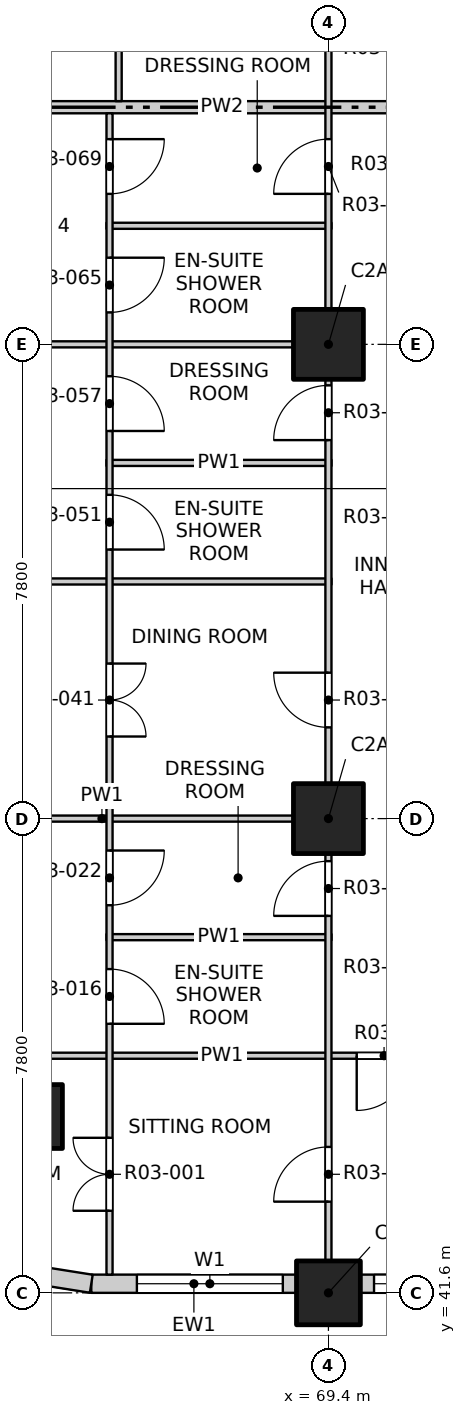
"""IFC4 building model, lengths in metres.
Left out: names, types, materials, properties, quantities, classifications, styles, units other than length and angle.
Written with IfcOpenShell. Run it as: python <this file> out.ifc"""

import sys

from ifc_helpers import new_model, si_unit, direction, frame, frame_2d, origin, origin_2d, place, context, subcontext, project, spatial, rectangle, extrude, element, fill, save


model = new_model("IFC4")
c1 = context("Model", 3, precision=1e-05, world=origin(), true_north=direction((0.0, 1.0)))
c2 = subcontext(c1, "Body", "Model", "MODEL_VIEW")
j1 = project(units=[si_unit("LENGTHUNIT", "METRE"), si_unit("PLANEANGLEUNIT", "RADIAN")], contexts=[c1])
p1 = place(None, origin())
s1 = spatial("IfcSite", under=j1, at=p1, CompositionType="ELEMENT")
p2 = place(p1, origin())
s2 = spatial("IfcBuilding", under=s1, at=p2, CompositionType="ELEMENT")
p3 = place(p2, frame((0.0, 0.0, 39.9)))
s3 = spatial("IfcBuildingStorey", under=s2, at=p3, CompositionType="ELEMENT", Elevation=39.9)
for number, where, z_axis, x_axis in (
    (1, (64.5, 44.5, -0.25), (0.0, 0.0, 1.0), (1.0, 0.0, 0.0)),
    (2, (69.4, 41.6, -0.25), (0.0, 0.0, 1.0), (1.0, 0.0, 0.0)),
):
    element("IfcColumn", number, at=place(p3, frame(where, z_axis=z_axis, x_axis=x_axis)), inside=s3, PredefinedType="COLUMN", context=c2, shape_type="SweptSolid", body=[
        extrude(rectangle(XDim=1.05, YDim=1.05, at=origin_2d()), origin(), (0.0, 0.0, 1.0), 3.4),
    ])
for number, where, z_axis, x_axis in (
    (3, (69.4, 49.4, -0.25), (0.0, 0.0, 1.0), (1.0, 0.0, 0.0)),
    (4, (69.4, 57.2, -0.25), (0.0, 0.0, 1.0), (1.0, 0.0, 0.0)),
):
    element("IfcColumn", number, at=place(p3, frame(where, z_axis=z_axis, x_axis=x_axis)), inside=s3, PredefinedType="COLUMN", context=c2, shape_type="SweptSolid", body=[
        extrude(rectangle(XDim=1.15, YDim=1.15, at=origin_2d()), origin(), (0.0, 0.0, 1.0), 3.4),
    ])
p4 = place(p3, frame((65.5, 41.75, 0.0), z_axis=(0.0, 0.0, 1.0), x_axis=(1.0, 0.0, 0.0)))
e5 = element("IfcWall", 5, at=p4, inside=s3, PredefinedType="SOLIDWALL", context=c2, shape_type="SweptSolid", body=[
    extrude(rectangle(XDim=3.375, YDim=0.3, at=frame_2d((1.688, 0.0))), origin(), (0.0, 0.0, 1.0), 2.7),
])
p5 = place(p4, frame((0.75, 0.0, 0.9)))
e6 = element("IfcOpeningElement", 6, at=p5, cuts=e5, PredefinedType="OPENING", context=c2, shape_type="SweptSolid", body=[
    extrude(rectangle(XDim=2.4, YDim=1.8, at=frame_2d((1.2, 0.9))), frame((0.0, 0.16, 0.0), z_axis=(0.0, -1.0, 0.0), x_axis=(1.0, 0.0, 0.0)), (0.0, 0.0, 1.0), 0.32),
])
p6 = place(p3, frame((69.925, 41.75, 0.0), z_axis=(0.0, 0.0, 1.0), x_axis=(1.0, 0.0, 0.0)))
e7 = element("IfcWall", 7, at=p6, inside=s3, PredefinedType="SOLIDWALL", context=c2, shape_type="SweptSolid", body=[
    extrude(rectangle(XDim=6.75, YDim=0.3, at=frame_2d((3.375, 0.0))), origin(), (0.0, 0.0, 1.0), 2.7),
])
p7 = place(p6, frame((0.225, 0.0, 0.9)))
e8 = element("IfcOpeningElement", 8, at=p7, cuts=e7, PredefinedType="OPENING", context=c2, shape_type="SweptSolid", body=[
    extrude(rectangle(XDim=2.4, YDim=1.8, at=frame_2d((1.2, 0.9))), frame((0.0, 0.16, 0.0), z_axis=(0.0, -1.0, 0.0), x_axis=(1.0, 0.0, 0.0)), (0.0, 0.0, 1.0), 0.32),
])
p8 = place(p6, frame((4.125, 0.0, 0.9)))
e9 = element("IfcOpeningElement", 9, at=p8, cuts=e7, PredefinedType="OPENING", context=c2, shape_type="SweptSolid", body=[
    extrude(rectangle(XDim=2.4, YDim=1.8, at=frame_2d((1.2, 0.9))), frame((0.0, 0.16, 0.0), z_axis=(0.0, -1.0, 0.0), x_axis=(1.0, 0.0, 0.0)), (0.0, 0.0, 1.0), 0.32),
])
p9 = place(p3, frame((64.341, 41.934, 0.0), z_axis=(0.0, 0.0, 1.0), x_axis=(0.987678452879, -0.156496880861, 0.0)))
e10 = element("IfcWall", 10, at=p9, inside=s3, PredefinedType="SOLIDWALL", context=c2, shape_type="SweptSolid", body=[
    extrude(rectangle(XDim=1.173, YDim=0.3, at=frame_2d((0.586, 0.0))), origin(), (0.0, 0.0, 1.0), 2.7),
])
p10 = place(p3, frame((61.9, 45.5, 0.0), z_axis=(0.0, 0.0, 1.0), x_axis=(1.0, 0.0, 0.0)))
e11 = element("IfcWall", 11, at=p10, inside=s3, PredefinedType="PARTITIONING", context=c2, shape_type="SweptSolid", body=[
    extrude(rectangle(XDim=11.5, YDim=0.1, at=frame_2d((5.75, 0.0))), origin(), (0.0, 0.0, 1.0), 3.15),
])
p11 = place(p10, frame((7.965, 0.0, 0.0)))
e12 = element("IfcOpeningElement", 12, at=p11, cuts=e11, PredefinedType="OPENING", context=c2, shape_type="SweptSolid", body=[
    extrude(rectangle(XDim=0.9, YDim=2.1, at=frame_2d((0.45, 1.05))), frame((0.0, 0.06, 0.0), z_axis=(0.0, -1.0, 0.0), x_axis=(1.0, 0.0, 0.0)), (0.0, 0.0, 1.0), 0.12),
])
p12 = place(p3, frame((65.75, 47.45, 0.0), z_axis=(0.0, 0.0, 1.0), x_axis=(1.0, 0.0, 0.0)))
e13 = element("IfcWall", 13, at=p12, inside=s3, PredefinedType="PARTITIONING", context=c2, shape_type="SweptSolid", body=[
    extrude(rectangle(XDim=3.7, YDim=0.1, at=frame_2d((1.85, 0.0))), origin(), (0.0, 0.0, 1.0), 3.15),
])
for number, where, z_axis, x_axis in (
    (14, (61.9, 49.4, 0.0), (0.0, 0.0, 1.0), (1.0, 0.0, 0.0)),
    (15, (61.9, 53.3, 0.0), (0.0, 0.0, 1.0), (1.0, 0.0, 0.0)),
):
    element("IfcWall", number, at=place(p3, frame(where, z_axis=z_axis, x_axis=x_axis)), inside=s3, PredefinedType="PARTITIONING", context=c2, shape_type="SweptSolid", body=[
        extrude(rectangle(XDim=7.55, YDim=0.1, at=frame_2d((3.775, 0.0))), origin(), (0.0, 0.0, 1.0), 3.15),
    ])
p13 = place(p3, frame((65.75, 55.25, 0.0), z_axis=(0.0, 0.0, 1.0), x_axis=(1.0, 0.0, 0.0)))
e16 = element("IfcWall", 16, at=p13, inside=s3, PredefinedType="PARTITIONING", context=c2, shape_type="SweptSolid", body=[
    extrude(rectangle(XDim=3.7, YDim=0.1, at=frame_2d((1.85, 0.0))), origin(), (0.0, 0.0, 1.0), 3.15),
])
p14 = place(p3, frame((61.9, 57.2, 0.0), z_axis=(0.0, 0.0, 1.0), x_axis=(1.0, 0.0, 0.0)))
e17 = element("IfcWall", 17, at=p14, inside=s3, PredefinedType="PARTITIONING", context=c2, shape_type="SweptSolid", body=[
    extrude(rectangle(XDim=7.55, YDim=0.1, at=frame_2d((3.775, 0.0))), origin(), (0.0, 0.0, 1.0), 2.55),
])
p15 = place(p3, frame((65.75, 59.15, 0.0), z_axis=(0.0, 0.0, 1.0), x_axis=(1.0, 0.0, 0.0)))
e18 = element("IfcWall", 18, at=p15, inside=s3, PredefinedType="PARTITIONING", context=c2, shape_type="SweptSolid", body=[
    extrude(rectangle(XDim=3.7, YDim=0.1, at=frame_2d((1.85, 0.0))), origin(), (0.0, 0.0, 1.0), 3.15),
])
p16 = place(p3, frame((61.9, 61.1, 0.0), z_axis=(0.0, 0.0, 1.0), x_axis=(1.0, 0.0, 0.0)))
e19 = element("IfcWall", 19, at=p16, inside=s3, PredefinedType="PARTITIONING", context=c2, shape_type="SweptSolid", body=[
    extrude(rectangle(XDim=11.5, YDim=0.2, at=frame_2d((5.75, 0.0))), origin(), (0.0, 0.0, 1.0), 3.15),
])
p17 = place(p3, frame((65.8, 41.9, 0.0), z_axis=(0.0, 0.0, 1.0), x_axis=(0.0, 1.0, 0.0)))
e20 = element("IfcWall", 20, at=p17, inside=s3, PredefinedType="PARTITIONING", context=c2, shape_type="SweptSolid", body=[
    extrude(rectangle(XDim=19.1, YDim=0.1, at=frame_2d((9.55, 0.0))), origin(), (0.0, 0.0, 1.0), 3.15),
])
p18 = place(p17, frame((1.05, 0.0, 0.0)))
e21 = element("IfcOpeningElement", 21, at=p18, cuts=e20, PredefinedType="OPENING", context=c2, shape_type="SweptSolid", body=[
    extrude(rectangle(XDim=1.2, YDim=2.1, at=frame_2d((0.6, 1.05))), frame((0.0, 0.06, 0.0), z_axis=(0.0, -1.0, 0.0), x_axis=(1.0, 0.0, 0.0)), (0.0, 0.0, 1.0), 0.12),
])
p19 = place(p17, frame((4.125, 0.0, 0.0)))
e22 = element("IfcOpeningElement", 22, at=p19, cuts=e20, PredefinedType="OPENING", context=c2, shape_type="SweptSolid", body=[
    extrude(rectangle(XDim=0.9, YDim=2.1, at=frame_2d((0.45, 1.05))), frame((0.0, 0.06, 0.0), z_axis=(0.0, -1.0, 0.0), x_axis=(1.0, 0.0, 0.0)), (0.0, 0.0, 1.0), 0.12),
])
p20 = place(p17, frame((6.075, 0.0, 0.0)))
e23 = element("IfcOpeningElement", 23, at=p20, cuts=e20, PredefinedType="OPENING", context=c2, shape_type="SweptSolid", body=[
    extrude(rectangle(XDim=0.9, YDim=2.1, at=frame_2d((0.45, 1.05))), frame((0.0, 0.06, 0.0), z_axis=(0.0, -1.0, 0.0), x_axis=(1.0, 0.0, 0.0)), (0.0, 0.0, 1.0), 0.12),
])
p21 = place(p17, frame((8.85, 0.0, 0.0)))
e24 = element("IfcOpeningElement", 24, at=p21, cuts=e20, PredefinedType="OPENING", context=c2, shape_type="SweptSolid", body=[
    extrude(rectangle(XDim=1.2, YDim=2.1, at=frame_2d((0.6, 1.05))), frame((0.0, 0.06, 0.0), z_axis=(0.0, -1.0, 0.0), x_axis=(1.0, 0.0, 0.0)), (0.0, 0.0, 1.0), 0.12),
])
p22 = place(p17, frame((11.925, 0.0, 0.0)))
e25 = element("IfcOpeningElement", 25, at=p22, cuts=e20, PredefinedType="OPENING", context=c2, shape_type="SweptSolid", body=[
    extrude(rectangle(XDim=0.9, YDim=2.1, at=frame_2d((0.45, 1.05))), frame((0.0, 0.06, 0.0), z_axis=(0.0, -1.0, 0.0), x_axis=(1.0, 0.0, 0.0)), (0.0, 0.0, 1.0), 0.12),
])
p23 = place(p17, frame((13.875, 0.0, 0.0)))
e26 = element("IfcOpeningElement", 26, at=p23, cuts=e20, PredefinedType="OPENING", context=c2, shape_type="SweptSolid", body=[
    extrude(rectangle(XDim=0.9, YDim=2.1, at=frame_2d((0.45, 1.05))), frame((0.0, 0.06, 0.0), z_axis=(0.0, -1.0, 0.0), x_axis=(1.0, 0.0, 0.0)), (0.0, 0.0, 1.0), 0.12),
])
p24 = place(p17, frame((15.825, 0.0, 0.0)))
e27 = element("IfcOpeningElement", 27, at=p24, cuts=e20, PredefinedType="OPENING", context=c2, shape_type="SweptSolid", body=[
    extrude(rectangle(XDim=0.9, YDim=2.1, at=frame_2d((0.45, 1.05))), frame((0.0, 0.06, 0.0), z_axis=(0.0, -1.0, 0.0), x_axis=(1.0, 0.0, 0.0)), (0.0, 0.0, 1.0), 0.12),
])
p25 = place(p17, frame((17.775, 0.0, 0.0)))
e28 = element("IfcOpeningElement", 28, at=p25, cuts=e20, PredefinedType="OPENING", context=c2, shape_type="SweptSolid", body=[
    extrude(rectangle(XDim=0.9, YDim=2.1, at=frame_2d((0.45, 1.05))), frame((0.0, 0.06, 0.0), z_axis=(0.0, -1.0, 0.0), x_axis=(1.0, 0.0, 0.0)), (0.0, 0.0, 1.0), 0.12),
])
p26 = place(p3, frame((65.95, 61.2, 0.0), z_axis=(0.0, 0.0, 1.0), x_axis=(0.0, 1.0, 0.0)))
e29 = element("IfcWall", 29, at=p26, inside=s3, PredefinedType="PARTITIONING", context=c2, shape_type="SweptSolid", body=[
    extrude(rectangle(XDim=7.6, YDim=0.1, at=frame_2d((3.8, 0.0))), origin(), (0.0, 0.0, 1.0), 3.15),
])
p27 = place(p26, frame((1.25, 0.0, 0.0)))
e30 = element("IfcOpeningElement", 30, at=p27, cuts=e29, PredefinedType="OPENING", context=c2, shape_type="SweptSolid", body=[
    extrude(rectangle(XDim=1.2, YDim=2.1, at=frame_2d((0.6, 1.05))), frame((0.0, 0.06, 0.0), z_axis=(0.0, -1.0, 0.0), x_axis=(1.0, 0.0, 0.0)), (0.0, 0.0, 1.0), 0.12),
])
p28 = place(p26, frame((4.325, 0.0, 0.0)))
e31 = element("IfcOpeningElement", 31, at=p28, cuts=e29, PredefinedType="OPENING", context=c2, shape_type="SweptSolid", body=[
    extrude(rectangle(XDim=0.9, YDim=2.1, at=frame_2d((0.45, 1.05))), frame((0.0, 0.06, 0.0), z_axis=(0.0, -1.0, 0.0), x_axis=(1.0, 0.0, 0.0)), (0.0, 0.0, 1.0), 0.12),
])
p29 = place(p26, frame((6.275, 0.0, 0.0)))
e32 = element("IfcOpeningElement", 32, at=p29, cuts=e29, PredefinedType="OPENING", context=c2, shape_type="SweptSolid", body=[
    extrude(rectangle(XDim=0.9, YDim=2.1, at=frame_2d((0.45, 1.05))), frame((0.0, 0.06, 0.0), z_axis=(0.0, -1.0, 0.0), x_axis=(1.0, 0.0, 0.0)), (0.0, 0.0, 1.0), 0.12),
])
p30 = place(p3, frame((69.4, 41.9, 0.0), z_axis=(0.0, 0.0, 1.0), x_axis=(0.0, 1.0, 0.0)))
e33 = element("IfcWall", 33, at=p30, inside=s3, PredefinedType="PARTITIONING", context=c2, shape_type="SweptSolid", body=[
    extrude(rectangle(XDim=46.2, YDim=0.1, at=frame_2d((23.1, 0.0))), origin(), (0.0, 0.0, 1.0), 3.15),
])
p31 = place(p30, frame((1.2, 0.0, 0.0)))
e34 = element("IfcOpeningElement", 34, at=p31, cuts=e33, PredefinedType="OPENING", context=c2, shape_type="SweptSolid", body=[
    extrude(rectangle(XDim=0.9, YDim=2.1, at=frame_2d((0.45, 1.05))), frame((0.0, 0.06, 0.0), z_axis=(0.0, -1.0, 0.0), x_axis=(1.0, 0.0, 0.0)), (0.0, 0.0, 1.0), 0.12),
])
p32 = place(p30, frame((5.9, 0.0, 0.0)))
e35 = element("IfcOpeningElement", 35, at=p32, cuts=e33, PredefinedType="OPENING", context=c2, shape_type="SweptSolid", body=[
    extrude(rectangle(XDim=0.9, YDim=2.1, at=frame_2d((0.45, 1.05))), frame((0.0, 0.06, 0.0), z_axis=(0.0, -1.0, 0.0), x_axis=(1.0, 0.0, 0.0)), (0.0, 0.0, 1.0), 0.12),
])
p33 = place(p30, frame((9.0, 0.0, 0.0)))
e36 = element("IfcOpeningElement", 36, at=p33, cuts=e33, PredefinedType="OPENING", context=c2, shape_type="SweptSolid", body=[
    extrude(rectangle(XDim=0.9, YDim=2.1, at=frame_2d((0.45, 1.05))), frame((0.0, 0.06, 0.0), z_axis=(0.0, -1.0, 0.0), x_axis=(1.0, 0.0, 0.0)), (0.0, 0.0, 1.0), 0.12),
])
p34 = place(p30, frame((13.725, 0.0, 0.0)))
e37 = element("IfcOpeningElement", 37, at=p34, cuts=e33, PredefinedType="OPENING", context=c2, shape_type="SweptSolid", body=[
    extrude(rectangle(XDim=0.9, YDim=2.1, at=frame_2d((0.45, 1.05))), frame((0.0, 0.06, 0.0), z_axis=(0.0, -1.0, 0.0), x_axis=(1.0, 0.0, 0.0)), (0.0, 0.0, 1.0), 0.12),
])
p35 = place(p30, frame((17.775, 0.0, 0.0)))
e38 = element("IfcOpeningElement", 38, at=p35, cuts=e33, PredefinedType="OPENING", context=c2, shape_type="SweptSolid", body=[
    extrude(rectangle(XDim=0.9, YDim=2.1, at=frame_2d((0.45, 1.05))), frame((0.0, 0.06, 0.0), z_axis=(0.0, -1.0, 0.0), x_axis=(1.0, 0.0, 0.0)), (0.0, 0.0, 1.0), 0.12),
])
p36 = place(p30, frame((20.7, 0.0, 0.0)))
e39 = element("IfcOpeningElement", 39, at=p36, cuts=e33, PredefinedType="OPENING", context=c2, shape_type="SweptSolid", body=[
    extrude(rectangle(XDim=0.9, YDim=2.1, at=frame_2d((0.45, 1.05))), frame((0.0, 0.06, 0.0), z_axis=(0.0, -1.0, 0.0), x_axis=(1.0, 0.0, 0.0)), (0.0, 0.0, 1.0), 0.12),
])
p37 = place(p30, frame((25.575, 0.0, 0.0)))
e40 = element("IfcOpeningElement", 40, at=p37, cuts=e33, PredefinedType="OPENING", context=c2, shape_type="SweptSolid", body=[
    extrude(rectangle(XDim=0.9, YDim=2.1, at=frame_2d((0.45, 1.05))), frame((0.0, 0.06, 0.0), z_axis=(0.0, -1.0, 0.0), x_axis=(1.0, 0.0, 0.0)), (0.0, 0.0, 1.0), 0.12),
])
p38 = place(p30, frame((28.5, 0.0, 0.0)))
e41 = element("IfcOpeningElement", 41, at=p38, cuts=e33, PredefinedType="OPENING", context=c2, shape_type="SweptSolid", body=[
    extrude(rectangle(XDim=0.9, YDim=2.1, at=frame_2d((0.45, 1.05))), frame((0.0, 0.06, 0.0), z_axis=(0.0, -1.0, 0.0), x_axis=(1.0, 0.0, 0.0)), (0.0, 0.0, 1.0), 0.12),
])
p39 = place(p30, frame((33.375, 0.0, 0.0)))
e42 = element("IfcOpeningElement", 42, at=p39, cuts=e33, PredefinedType="OPENING", context=c2, shape_type="SweptSolid", body=[
    extrude(rectangle(XDim=0.9, YDim=2.1, at=frame_2d((0.45, 1.05))), frame((0.0, 0.06, 0.0), z_axis=(0.0, -1.0, 0.0), x_axis=(1.0, 0.0, 0.0)), (0.0, 0.0, 1.0), 0.12),
])
p40 = place(p30, frame((36.3, 0.0, 0.0)))
e43 = element("IfcOpeningElement", 43, at=p40, cuts=e33, PredefinedType="OPENING", context=c2, shape_type="SweptSolid", body=[
    extrude(rectangle(XDim=0.9, YDim=2.1, at=frame_2d((0.45, 1.05))), frame((0.0, 0.06, 0.0), z_axis=(0.0, -1.0, 0.0), x_axis=(1.0, 0.0, 0.0)), (0.0, 0.0, 1.0), 0.12),
])
p41 = place(p30, frame((40.2, 0.0, 0.0)))
e44 = element("IfcOpeningElement", 44, at=p41, cuts=e33, PredefinedType="OPENING", context=c2, shape_type="SweptSolid", body=[
    extrude(rectangle(XDim=0.9, YDim=2.1, at=frame_2d((0.45, 1.05))), frame((0.0, 0.06, 0.0), z_axis=(0.0, -1.0, 0.0), x_axis=(1.0, 0.0, 0.0)), (0.0, 0.0, 1.0), 0.12),
])
p42 = place(p30, frame((44.1, 0.0, 0.0)))
e45 = element("IfcOpeningElement", 45, at=p42, cuts=e33, PredefinedType="OPENING", context=c2, shape_type="SweptSolid", body=[
    extrude(rectangle(XDim=0.9, YDim=2.1, at=frame_2d((0.45, 1.05))), frame((0.0, 0.06, 0.0), z_axis=(0.0, -1.0, 0.0), x_axis=(1.0, 0.0, 0.0)), (0.0, 0.0, 1.0), 0.12),
])
p43 = place(p5, origin())
e46 = element("IfcWindow", 46, at=p43, inside=s3, PartitioningType="DOUBLE_PANEL_VERTICAL", PredefinedType="WINDOW", context=c2, shape_type="SweptSolid", body=[
    extrude(rectangle(XDim=2.4, YDim=1.8, at=frame_2d((1.2, 0.9))), frame((0.0, 0.03, 0.0), z_axis=(0.0, -1.0, 0.0), x_axis=(1.0, 0.0, 0.0)), (0.0, 0.0, 1.0), 0.06),
])
fill(e6, e46)
p44 = place(p7, origin())
e47 = element("IfcWindow", 47, at=p44, inside=s3, PartitioningType="DOUBLE_PANEL_VERTICAL", PredefinedType="WINDOW", context=c2, shape_type="SweptSolid", body=[
    extrude(rectangle(XDim=2.4, YDim=1.8, at=frame_2d((1.2, 0.9))), frame((0.0, 0.03, 0.0), z_axis=(0.0, -1.0, 0.0), x_axis=(1.0, 0.0, 0.0)), (0.0, 0.0, 1.0), 0.06),
])
fill(e8, e47)
p45 = place(p18, origin())
e48 = element("IfcDoor", 48, at=p45, inside=s3, OperationType="DOUBLE_DOOR_SINGLE_SWING", PredefinedType="DOOR", context=c2, shape_type="SweptSolid", body=[
    extrude(rectangle(XDim=1.2, YDim=2.1, at=frame_2d((0.6, 1.05))), frame((0.0, 0.025, 0.0), z_axis=(0.0, -1.0, 0.0), x_axis=(1.0, 0.0, 0.0)), (0.0, 0.0, 1.0), 0.05),
])
fill(e21, e48)
p46 = place(p31, origin())
e49 = element("IfcDoor", 49, at=p46, inside=s3, OperationType="SINGLE_SWING_LEFT", PredefinedType="DOOR", context=c2, shape_type="SweptSolid", body=[
    extrude(rectangle(XDim=0.9, YDim=2.1, at=frame_2d((0.45, 1.05))), frame((0.0, 0.025, 0.0), z_axis=(0.0, -1.0, 0.0), x_axis=(1.0, 0.0, 0.0)), (0.0, 0.0, 1.0), 0.05),
])
fill(e34, e49)
p47 = place(p11, origin())
e50 = element("IfcDoor", 50, at=p47, inside=s3, OperationType="SINGLE_SWING_RIGHT", PredefinedType="DOOR", context=c2, shape_type="SweptSolid", body=[
    extrude(rectangle(XDim=0.9, YDim=2.1, at=frame_2d((0.45, 1.05))), frame((0.0, 0.025, 0.0), z_axis=(0.0, -1.0, 0.0), x_axis=(1.0, 0.0, 0.0)), (0.0, 0.0, 1.0), 0.05),
])
fill(e12, e50)
p48 = place(p19, origin())
e51 = element("IfcDoor", 51, at=p48, inside=s3, OperationType="SINGLE_SWING_RIGHT", PredefinedType="DOOR", context=c2, shape_type="SweptSolid", body=[
    extrude(rectangle(XDim=0.9, YDim=2.1, at=frame_2d((0.45, 1.05))), frame((0.0, 0.025, 0.0), z_axis=(0.0, -1.0, 0.0), x_axis=(1.0, 0.0, 0.0)), (0.0, 0.0, 1.0), 0.05),
])
fill(e22, e51)
p49 = place(p32, origin())
e52 = element("IfcDoor", 52, at=p49, inside=s3, OperationType="SINGLE_SWING_LEFT", PredefinedType="DOOR", context=c2, shape_type="SweptSolid", body=[
    extrude(rectangle(XDim=0.9, YDim=2.1, at=frame_2d((0.45, 1.05))), frame((0.0, 0.025, 0.0), z_axis=(0.0, -1.0, 0.0), x_axis=(1.0, 0.0, 0.0)), (0.0, 0.0, 1.0), 0.05),
])
fill(e35, e52)
p50 = place(p20, origin())
e53 = element("IfcDoor", 53, at=p50, inside=s3, OperationType="SINGLE_SWING_LEFT", PredefinedType="DOOR", context=c2, shape_type="SweptSolid", body=[
    extrude(rectangle(XDim=0.9, YDim=2.1, at=frame_2d((0.45, 1.05))), frame((0.0, 0.025, 0.0), z_axis=(0.0, -1.0, 0.0), x_axis=(1.0, 0.0, 0.0)), (0.0, 0.0, 1.0), 0.05),
])
fill(e23, e53)
p51 = place(p21, origin())
e54 = element("IfcDoor", 54, at=p51, inside=s3, OperationType="DOUBLE_DOOR_SINGLE_SWING", PredefinedType="DOOR", context=c2, shape_type="SweptSolid", body=[
    extrude(rectangle(XDim=1.2, YDim=2.1, at=frame_2d((0.6, 1.05))), frame((0.0, 0.025, 0.0), z_axis=(0.0, -1.0, 0.0), x_axis=(1.0, 0.0, 0.0)), (0.0, 0.0, 1.0), 0.05),
])
fill(e24, e54)
p52 = place(p33, origin())
e55 = element("IfcDoor", 55, at=p52, inside=s3, OperationType="SINGLE_SWING_RIGHT", PredefinedType="DOOR", context=c2, shape_type="SweptSolid", body=[
    extrude(rectangle(XDim=0.9, YDim=2.1, at=frame_2d((0.45, 1.05))), frame((0.0, 0.025, 0.0), z_axis=(0.0, -1.0, 0.0), x_axis=(1.0, 0.0, 0.0)), (0.0, 0.0, 1.0), 0.05),
])
fill(e36, e55)
p53 = place(p22, origin())
e56 = element("IfcDoor", 56, at=p53, inside=s3, OperationType="SINGLE_SWING_RIGHT", PredefinedType="DOOR", context=c2, shape_type="SweptSolid", body=[
    extrude(rectangle(XDim=0.9, YDim=2.1, at=frame_2d((0.45, 1.05))), frame((0.0, 0.025, 0.0), z_axis=(0.0, -1.0, 0.0), x_axis=(1.0, 0.0, 0.0)), (0.0, 0.0, 1.0), 0.05),
])
fill(e25, e56)
p54 = place(p34, origin())
e57 = element("IfcDoor", 57, at=p54, inside=s3, OperationType="SINGLE_SWING_LEFT", PredefinedType="DOOR", context=c2, shape_type="SweptSolid", body=[
    extrude(rectangle(XDim=0.9, YDim=2.1, at=frame_2d((0.45, 1.05))), frame((0.0, 0.025, 0.0), z_axis=(0.0, -1.0, 0.0), x_axis=(1.0, 0.0, 0.0)), (0.0, 0.0, 1.0), 0.05),
])
fill(e37, e57)
p55 = place(p23, origin())
e58 = element("IfcDoor", 58, at=p55, inside=s3, OperationType="SINGLE_SWING_RIGHT", PredefinedType="DOOR", context=c2, shape_type="SweptSolid", body=[
    extrude(rectangle(XDim=0.9, YDim=2.1, at=frame_2d((0.45, 1.05))), frame((0.0, 0.025, 0.0), z_axis=(0.0, -1.0, 0.0), x_axis=(1.0, 0.0, 0.0)), (0.0, 0.0, 1.0), 0.05),
])
fill(e26, e58)
p56 = place(p24, origin())
e59 = element("IfcDoor", 59, at=p56, inside=s3, OperationType="SINGLE_SWING_LEFT", PredefinedType="DOOR", context=c2, shape_type="SweptSolid", body=[
    extrude(rectangle(XDim=0.9, YDim=2.1, at=frame_2d((0.45, 1.05))), frame((0.0, 0.025, 0.0), z_axis=(0.0, -1.0, 0.0), x_axis=(1.0, 0.0, 0.0)), (0.0, 0.0, 1.0), 0.05),
])
fill(e27, e59)
p57 = place(p25, origin())
e60 = element("IfcDoor", 60, at=p57, inside=s3, OperationType="SINGLE_SWING_LEFT", PredefinedType="DOOR", context=c2, shape_type="SweptSolid", body=[
    extrude(rectangle(XDim=0.9, YDim=2.1, at=frame_2d((0.45, 1.05))), frame((0.0, 0.025, 0.0), z_axis=(0.0, -1.0, 0.0), x_axis=(1.0, 0.0, 0.0)), (0.0, 0.0, 1.0), 0.05),
])
fill(e28, e60)
p58 = place(p35, origin())
e61 = element("IfcDoor", 61, at=p58, inside=s3, OperationType="SINGLE_SWING_LEFT", PredefinedType="DOOR", context=c2, shape_type="SweptSolid", body=[
    extrude(rectangle(XDim=0.9, YDim=2.1, at=frame_2d((0.45, 1.05))), frame((0.0, 0.025, 0.0), z_axis=(0.0, -1.0, 0.0), x_axis=(1.0, 0.0, 0.0)), (0.0, 0.0, 1.0), 0.05),
])
fill(e38, e61)
save(model, sys.argv[1])
